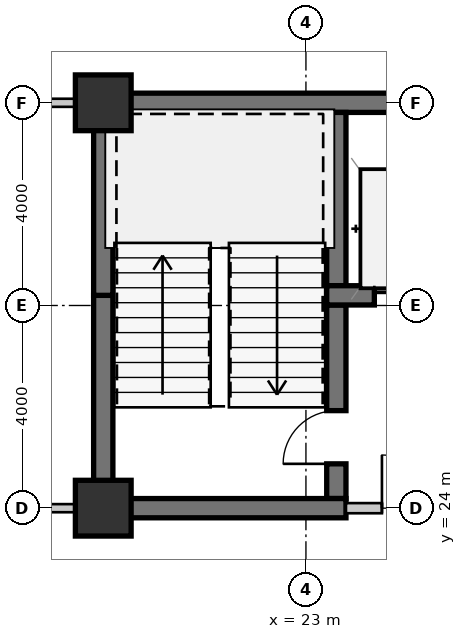
"""IFC4 building model, lengths in metres.
Left out: names, types, materials, properties, quantities, classifications, styles, units other than length and angle.
Written with IfcOpenShell. Run it as: python <this file> out.ifc"""

import sys

from ifc_helpers import new_model, si_unit, direction, frame, frame_2d, origin, origin_2d, place, context, subcontext, project, spatial, rectangle, extrude, source, transform, mapped, element, fill, save


model = new_model("IFC4")
c1 = context("Model", 3, precision=1e-05, world=origin(), true_north=direction((0.0, 1.0)))
c2 = subcontext(c1, "Body", "Model", "MODEL_VIEW")
j1 = project(units=[si_unit("LENGTHUNIT", "METRE"), si_unit("PLANEANGLEUNIT", "RADIAN")], contexts=[c1])
p1 = place(None, origin())
s1 = spatial("IfcSite", under=j1, at=p1, CompositionType="ELEMENT")
p2 = place(p1, origin())
s2 = spatial("IfcBuilding", under=s1, at=p2, CompositionType="ELEMENT")
p3 = place(p2, frame((0.0, 0.0, -8.0)))
s3 = spatial("IfcBuildingStorey", under=s2, at=p3, CompositionType="ELEMENT", Elevation=-8.0)
m1 = source(origin(), c2, "Body", "SweptSolid", [
    extrude(rectangle(XDim=1.1, YDim=1.1, at=origin_2d()), origin(), (0.0, 0.0, 1.0), 4.0),
])
for number, where, z_axis, x_axis in (
    (1, (19.0, 24.0, 0.0), (0.0, 0.0, 1.0), (1.0, 0.0, 0.0)),
    (2, (19.0, 32.0, 0.0), (0.0, 0.0, 1.0), (1.0, 0.0, 0.0)),
):
    element("IfcColumn", number, at=place(p3, frame(where, z_axis=z_axis, x_axis=x_axis)), inside=s3, PredefinedType="COLUMN", context=c2, shape_type="MappedRepresentation", body=[
        mapped(m1, transform((0.0, 0.0, 0.0), scale=1.0)),
    ])
m2 = source(origin(), c2, "Body", "SweptSolid", [
    extrude(rectangle(XDim=9.19, YDim=0.38, at=frame_2d((4.595, 0.0))), origin(), (0.0, 0.0, 1.0), 3.72),
])
p4 = place(p3, frame((18.81, 32.0, 0.0), z_axis=(0.0, 0.0, 1.0), x_axis=(1.0, 0.0, 0.0)))
e3 = element("IfcWall", 3, at=p4, inside=s3, PredefinedType="SHEAR", context=c2, shape_type="MappedRepresentation", body=[
    mapped(m2, transform((0.0, 0.0, 0.0), scale=1.0)),
])
m3 = source(origin(), c2, "Body", "SweptSolid", [
    extrude(rectangle(XDim=4.01, YDim=0.38, at=frame_2d((2.005, 0.0))), origin(), (0.0, 0.0, 1.0), 3.72),
])
p5 = place(p3, frame((19.0, 24.19, 0.0), z_axis=(0.0, 0.0, 1.0), x_axis=(0.0, 1.0, 0.0)))
e4 = element("IfcWall", 4, at=p5, inside=s3, PredefinedType="SHEAR", context=c2, shape_type="MappedRepresentation", body=[
    mapped(m3, transform((0.0, 0.0, 0.0), scale=1.0)),
])
m4 = source(origin(), c2, "Body", "SweptSolid", [
    extrude(rectangle(XDim=3.61, YDim=0.38, at=frame_2d((1.805, 0.0))), origin(), (0.0, 0.0, 1.0), 3.72),
])
p6 = place(p3, frame((19.0, 28.2, 0.0), z_axis=(0.0, 0.0, 1.0), x_axis=(0.0, 1.0, 0.0)))
e5 = element("IfcWall", 5, at=p6, inside=s3, PredefinedType="SHEAR", context=c2, shape_type="MappedRepresentation", body=[
    mapped(m4, transform((0.0, 0.0, 0.0), scale=1.0)),
])
m5 = source(origin(), c2, "Body", "SweptSolid", [
    extrude(rectangle(XDim=3.42, YDim=0.38, at=frame_2d((1.71, 0.0))), origin(), (0.0, 0.0, 1.0), 3.72),
])
p7 = place(p3, frame((23.6, 28.39, 0.0), z_axis=(0.0, 0.0, 1.0), x_axis=(0.0, 1.0, 0.0)))
e6 = element("IfcWall", 6, at=p7, inside=s3, PredefinedType="SHEAR", context=c2, shape_type="MappedRepresentation", body=[
    mapped(m5, transform((0.0, 0.0, 0.0), scale=1.0)),
])
m6 = source(origin(), c2, "Body", "SweptSolid", [
    extrude(rectangle(XDim=3.82, YDim=0.38, at=frame_2d((1.91, 0.0))), origin(), (0.0, 0.0, 1.0), 3.72),
])
p8 = place(p3, frame((23.6, 24.19, 0.0), z_axis=(0.0, 0.0, 1.0), x_axis=(0.0, 1.0, 0.0)))
e7 = element("IfcWall", 7, at=p8, inside=s3, PredefinedType="SHEAR", context=c2, shape_type="MappedRepresentation", body=[
    mapped(m6, transform((0.0, 0.0, 0.0), scale=1.0)),
])
m7 = source(origin(), c2, "Body", "SweptSolid", [
    extrude(rectangle(XDim=1.05, YDim=2.1, at=frame_2d((0.525, 1.05))), frame((0.0, 0.2, 0.0), z_axis=(0.0, -1.0, 0.0), x_axis=(1.0, 0.0, 0.0)), (0.0, 0.0, 1.0), 0.4),
])
p9 = place(p8, frame((0.685, 0.0, 0.0)))
e8 = element("IfcOpeningElement", 8, at=p9, cuts=e7, PredefinedType="OPENING", context=c2, shape_type="MappedRepresentation", body=[
    mapped(m7, transform((0.0, 0.0, 0.0), scale=1.0)),
])
m8 = source(origin(), c2, "Body", "SweptSolid", [
    extrude(rectangle(XDim=4.98, YDim=0.38, at=frame_2d((2.49, 0.0))), origin(), (0.0, 0.0, 1.0), 3.72),
])
p10 = place(p3, frame((18.81, 24.0, 0.0), z_axis=(0.0, 0.0, 1.0), x_axis=(1.0, 0.0, 0.0)))
e9 = element("IfcWall", 9, at=p10, inside=s3, PredefinedType="SHEAR", context=c2, shape_type="MappedRepresentation", body=[
    mapped(m8, transform((0.0, 0.0, 0.0), scale=1.0)),
])
m9 = source(origin(), c2, "Body", "SweptSolid", [
    extrude(rectangle(XDim=2.98, YDim=0.38, at=frame_2d((1.49, 0.0))), origin(), (0.0, 0.0, 1.0), 3.72),
])
p11 = place(p3, frame((23.41, 28.2, 0.0), z_axis=(0.0, 0.0, 1.0), x_axis=(1.0, 0.0, 0.0)))
e10 = element("IfcWall", 10, at=p11, inside=s3, PredefinedType="SHEAR", context=c2, shape_type="MappedRepresentation", body=[
    mapped(m9, transform((0.0, 0.0, 0.0), scale=1.0)),
])
m10 = source(origin(), c2, "Body", "SweptSolid", [
    extrude(rectangle(XDim=1.1, YDim=2.15, at=frame_2d((0.55, 1.075))), frame((0.0, 0.2, 0.0), z_axis=(0.0, -1.0, 0.0), x_axis=(1.0, 0.0, 0.0)), (0.0, 0.0, 1.0), 0.4),
])
p12 = place(p11, frame((0.94, 0.0, 0.0)))
e11 = element("IfcOpeningElement", 11, at=p12, cuts=e10, PredefinedType="OPENING", context=c2, shape_type="MappedRepresentation", body=[
    mapped(m10, transform((0.0, 0.0, 0.0), scale=1.0)),
])
m11 = source(origin(), c2, "Body", "SweptSolid", [
    extrude(rectangle(XDim=2.66, YDim=0.2, at=frame_2d((1.33, 0.0))), origin(), (0.0, 0.0, 1.0), 3.26),
])
p13 = place(p3, frame((23.79, 24.0, 0.0), z_axis=(0.0, 0.0, 1.0), x_axis=(1.0, 0.0, 0.0)))
e12 = element("IfcWall", 12, at=p13, inside=s3, PredefinedType="SOLIDWALL", context=c2, shape_type="MappedRepresentation", body=[
    mapped(m11, transform((0.0, 0.0, 0.0), scale=1.0)),
])
m12 = source(origin(), c2, "Body", "SweptSolid", [
    extrude(rectangle(XDim=1.05, YDim=2.1, at=frame_2d((0.525, 1.05))), frame((0.0, 0.11, 0.0), z_axis=(0.0, -1.0, 0.0), x_axis=(1.0, 0.0, 0.0)), (0.0, 0.0, 1.0), 0.22),
])
p14 = place(p13, frame((0.71, 0.0, 0.0)))
e13 = element("IfcOpeningElement", 13, at=p14, cuts=e12, PredefinedType="OPENING", context=c2, shape_type="MappedRepresentation", body=[
    mapped(m12, transform((0.0, 0.0, 0.0), scale=1.0)),
])
m13 = source(origin(), c2, "Body", "SweptSolid", [
    extrude(rectangle(XDim=10.93, YDim=0.16, at=frame_2d((5.465, 0.0))), origin(), (0.0, 0.0, 1.0), 3.72),
])
p15 = place(p3, frame((7.88, 24.0, 0.0), z_axis=(0.0, 0.0, 1.0), x_axis=(1.0, 0.0, 0.0)))
e14 = element("IfcWall", 14, at=p15, inside=s3, PredefinedType="PARTITIONING", context=c2, shape_type="MappedRepresentation", body=[
    mapped(m13, transform((0.0, 0.0, 0.0), scale=1.0)),
])
m14 = source(origin(), c2, "Body", "SweptSolid", [
    extrude(rectangle(XDim=3.79, YDim=0.16, at=frame_2d((1.895, 0.0))), origin(), (0.0, 0.0, 1.0), 3.187),
])
p16 = place(p3, frame((15.02, 32.0, 0.0), z_axis=(0.0, 0.0, 1.0), x_axis=(1.0, 0.0, 0.0)))
e15 = element("IfcWall", 15, at=p16, inside=s3, PredefinedType="PARTITIONING", context=c2, shape_type="MappedRepresentation", body=[
    mapped(m14, transform((0.0, 0.0, 0.0), scale=1.0)),
])
m15 = source(origin(), c2, "Body", "SweptSolid", [
    extrude(rectangle(XDim=1.05, YDim=2.1, at=frame_2d((0.525, 1.05))), frame((0.0, 0.025, 0.0), z_axis=(0.0, -1.0, 0.0), x_axis=(1.0, 0.0, 0.0)), (0.0, 0.0, 1.0), 0.05),
])
p17 = place(p9, origin())
e16 = element("IfcDoor", 16, at=p17, inside=s3, OperationType="SINGLE_SWING_LEFT", PredefinedType="DOOR", context=c2, shape_type="MappedRepresentation", body=[
    mapped(m15, transform((0.0, 0.0, 0.0), scale=1.0)),
])
fill(e8, e16)
m16 = source(origin(), c2, "Body", "SweptSolid", [
    extrude(rectangle(XDim=1.1, YDim=2.15, at=frame_2d((0.55, 1.075))), frame((0.0, 0.025, 0.0), z_axis=(0.0, -1.0, 0.0), x_axis=(1.0, 0.0, 0.0)), (0.0, 0.0, 1.0), 0.05),
])
p18 = place(p12, origin())
e17 = element("IfcDoor", 17, at=p18, inside=s3, OperationType="SLIDING_TO_LEFT", PredefinedType="DOOR", context=c2, shape_type="MappedRepresentation", body=[
    mapped(m16, transform((0.0, 0.0, 0.0), scale=1.0)),
])
fill(e11, e17)
p19 = place(p14, origin())
e18 = element("IfcDoor", 18, at=p19, inside=s3, OperationType="SINGLE_SWING_LEFT", PredefinedType="DOOR", context=c2, shape_type="MappedRepresentation", body=[
    mapped(m15, transform((0.0, 0.0, 0.0), scale=1.0)),
])
fill(e13, e18)
save(model, sys.argv[1])
